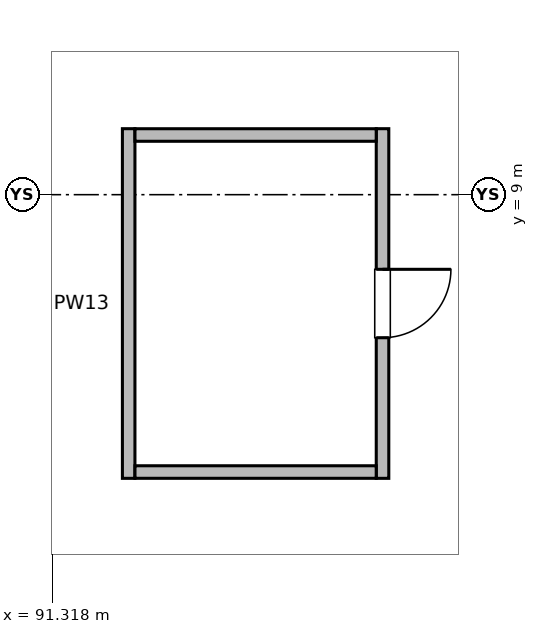
"""IFC4 building model, lengths in metres.
Left out: names, types, materials, properties, quantities, classifications, styles, units other than length and angle.
Written with IfcOpenShell. Run it as: python <this file> out.ifc"""

import sys

from ifc_helpers import new_model, si_unit, direction, frame, frame_2d, origin, place, context, subcontext, project, spatial, rectangle, extrude, element, fill, save


model = new_model("IFC4")
c1 = context("Model", 3, precision=1e-05, world=origin(), true_north=direction((0.0, 1.0)))
c2 = subcontext(c1, "Body", "Model", "MODEL_VIEW")
j1 = project(units=[si_unit("LENGTHUNIT", "METRE"), si_unit("PLANEANGLEUNIT", "RADIAN")], contexts=[c1])
p1 = place(None, origin())
s1 = spatial("IfcSite", under=j1, at=p1, CompositionType="ELEMENT")
p2 = place(p1, origin())
s2 = spatial("IfcBuilding", under=s1, at=p2, CompositionType="ELEMENT")
p3 = place(p2, frame((0.0, 0.0, -6.0)))
s3 = spatial("IfcBuildingStorey", under=s2, at=p3, CompositionType="ELEMENT", Elevation=-6.0)
p4 = place(p3, frame((95.663, 9.868, 0.0), z_axis=(0.0, 0.0, 1.0), x_axis=(0.0, -1.0, 0.0)))
e1 = element("IfcWall", 1, at=p4, inside=s3, PredefinedType="PARTITIONING", context=c2, shape_type="SweptSolid", body=[
    extrude(rectangle(XDim=4.6, YDim=0.165, at=frame_2d((2.3, 0.0))), origin(), (0.0, 0.0, 1.0), 5.02),
])
p5 = place(p4, frame((1.85, 0.0, 0.0)))
e2 = element("IfcOpeningElement", 2, at=p5, cuts=e1, PredefinedType="OPENING", context=c2, shape_type="SweptSolid", body=[
    extrude(rectangle(XDim=0.9, YDim=2.15, at=frame_2d((0.45, 1.075))), frame((0.0, 0.093, 0.0), z_axis=(0.0, -1.0, 0.0), x_axis=(1.0, 0.0, 0.0)), (0.0, 0.0, 1.0), 0.185),
])
p6 = place(p3, frame((92.323, 5.268, 0.0), z_axis=(0.0, 0.0, 1.0), x_axis=(0.0, 1.0, 0.0)))
e3 = element("IfcWall", 3, at=p6, inside=s3, PredefinedType="PARTITIONING", context=c2, shape_type="SweptSolid", body=[
    extrude(rectangle(XDim=4.6, YDim=0.165, at=frame_2d((2.3, 0.0))), origin(), (0.0, 0.0, 1.0), 5.02),
])
for number, where, z_axis, x_axis in (
    (4, (92.406, 5.351, 0.0), (0.0, 0.0, 1.0), (1.0, 0.0, 0.0)),
    (5, (92.406, 9.785, 0.0), (0.0, 0.0, 1.0), (1.0, 0.0, 0.0)),
):
    element("IfcWall", number, at=place(p3, frame(where, z_axis=z_axis, x_axis=x_axis)), inside=s3, PredefinedType="PARTITIONING", context=c2, shape_type="SweptSolid", body=[
        extrude(rectangle(XDim=3.174, YDim=0.165, at=frame_2d((1.587, 0.0))), origin(), (0.0, 0.0, 1.0), 5.02),
    ])
p7 = place(p5, origin())
e6 = element("IfcDoor", 6, at=p7, inside=s3, OperationType="SINGLE_SWING_LEFT", PredefinedType="DOOR", context=c2, shape_type="SweptSolid", body=[
    extrude(rectangle(XDim=0.9, YDim=2.15, at=frame_2d((0.45, 1.075))), frame((0.0, 0.025, 0.0), z_axis=(0.0, -1.0, 0.0), x_axis=(1.0, 0.0, 0.0)), (0.0, 0.0, 1.0), 0.05),
])
fill(e2, e6)
save(model, sys.argv[1])
